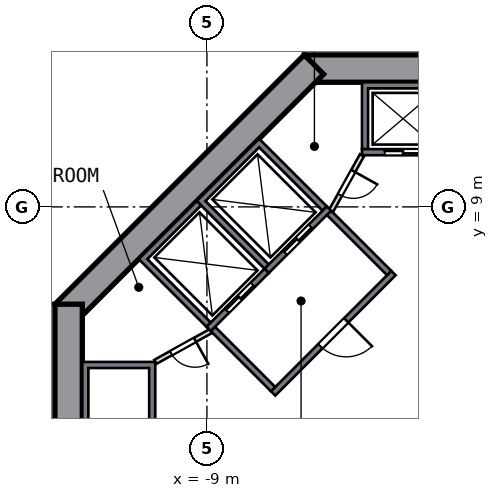
"""IFC4 building model, lengths in metres.
Left out: names, types, materials, properties, quantities, classifications, styles, units other than length and angle.
Written with IfcOpenShell. Run it as: python <this file> out.ifc"""

import sys

from ifc_helpers import new_model, si_unit, direction, frame, frame_2d, origin, place, context, subcontext, project, spatial, polyline, rectangle, outline, extrude, element, fill, save


model = new_model("IFC4")
c1 = context("Model", 3, precision=1e-05, world=origin(), true_north=direction((0.0, 1.0)))
c2 = subcontext(c1, "Body", "Model", "MODEL_VIEW")
j1 = project(units=[si_unit("LENGTHUNIT", "METRE"), si_unit("PLANEANGLEUNIT", "RADIAN")], contexts=[c1])
p1 = place(None, origin())
s1 = spatial("IfcSite", under=j1, at=p1, CompositionType="ELEMENT")
p2 = place(p1, origin())
s2 = spatial("IfcBuilding", under=s1, at=p2, CompositionType="ELEMENT")
p3 = place(p2, frame((0.0, 0.0, -3.9)))
s3 = spatial("IfcBuildingStorey", under=s2, at=p3, CompositionType="ELEMENT", Elevation=-3.9)
p4 = place(p3, frame((5.799, 13.55, 0.0), z_axis=(0.0, 0.0, 1.0), x_axis=(-1.0, 0.0, 0.0)))
e1 = element("IfcWall", 1, at=p4, inside=s3, PredefinedType="SHEAR", context=c2, shape_type="SweptSolid", body=[
    extrude(rectangle(XDim=11.598, YDim=0.9, at=frame_2d((5.799, 0.0))), origin(), (0.0, 0.0, 1.0), 3.9),
])
p5 = place(p4, frame((4.899, 0.0, 0.0)))
e2 = element("IfcOpeningElement", 2, at=p5, cuts=e1, PredefinedType="OPENING", context=c2, shape_type="SweptSolid", body=[
    extrude(rectangle(XDim=1.8, YDim=2.1, at=frame_2d((0.9, 1.05))), frame((0.0, 0.46, 0.0), z_axis=(0.0, -1.0, 0.0), x_axis=(1.0, 0.0, 0.0)), (0.0, 0.0, 1.0), 0.92),
])
p6 = place(p3, frame((-5.481, 13.682, 0.0), z_axis=(0.0, 0.0, 1.0), x_axis=(-0.707106781, -0.707106781, 0.0)))
e3 = element("IfcWall", 3, at=p6, inside=s3, PredefinedType="SHEAR", context=c2, shape_type="SweptSolid", body=[
    extrude(rectangle(XDim=11.598, YDim=0.9, at=frame_2d((5.799, 0.0))), origin(), (0.0, 0.0, 1.0), 3.9),
])
p7 = place(p3, frame((-13.55, 5.799, 0.0), z_axis=(0.0, 0.0, 1.0), x_axis=(0.0, -1.0, 0.0)))
e4 = element("IfcWall", 4, at=p7, inside=s3, PredefinedType="SHEAR", context=c2, shape_type="SweptSolid", body=[
    extrude(rectangle(XDim=11.598, YDim=0.9, at=frame_2d((5.799, 0.0))), origin(), (0.0, 0.0, 1.0), 3.9),
])
p8 = place(p7, frame((4.899, 0.0, 0.0)))
e5 = element("IfcOpeningElement", 5, at=p8, cuts=e4, PredefinedType="OPENING", context=c2, shape_type="SweptSolid", body=[
    extrude(rectangle(XDim=1.8, YDim=2.1, at=frame_2d((0.9, 1.05))), frame((0.0, 0.46, 0.0), z_axis=(0.0, -1.0, 0.0), x_axis=(1.0, 0.0, 0.0)), (0.0, 0.0, 1.0), 0.92),
])
p9 = place(p3, origin())
e6 = element("IfcWall", 6, at=p9, inside=s3, PredefinedType="SOLIDWALL", context=c2, shape_type="SweptSolid", body=[
    extrude(outline(polyline([(-3.9, 10.9), (-3.9, 13.1), (-1.2, 13.1), (-1.2, 10.9), (-1.4, 10.9), (-1.4, 12.9), (-3.7, 12.9), (-3.7, 10.9), (-3.9, 10.9)])), origin(), (0.0, 0.0, 1.0), 3.45),
])
p10 = place(p3, frame((-1.2, 10.8, 0.0), z_axis=(0.0, 0.0, 1.0), x_axis=(-1.0, 0.0, 0.0)))
e7 = element("IfcWall", 7, at=p10, inside=s3, PredefinedType="SOLIDWALL", context=c2, shape_type="SweptSolid", body=[
    extrude(rectangle(XDim=2.7, YDim=0.2, at=frame_2d((1.35, 0.0))), origin(), (0.0, 0.0, 1.0), 3.45),
])
p11 = place(p10, frame((0.75, 0.0, 0.0)))
e8 = element("IfcOpeningElement", 8, at=p11, cuts=e7, PredefinedType="OPENING", context=c2, shape_type="SweptSolid", body=[
    extrude(rectangle(XDim=1.2, YDim=2.1, at=frame_2d((0.6, 1.05))), frame((0.0, 0.11, 0.0), z_axis=(0.0, -1.0, 0.0), x_axis=(1.0, 0.0, 0.0)), (0.0, 0.0, 1.0), 0.22),
])
p12 = place(p3, origin())
e9 = element("IfcWall", 9, at=p12, inside=s3, PredefinedType="SOLIDWALL", context=c2, shape_type="SweptSolid", body=[
    extrude(outline(polyline([(-13.1, 1.2), (-13.1, 3.9), (-10.7, 3.9), (-10.7, 1.2), (-13.1, 1.2)]), holes=[polyline([(-10.9, 3.7), (-12.9, 3.7), (-12.9, 1.4), (-10.9, 1.4), (-10.9, 3.7)])]), origin(), (0.0, 0.0, 1.0), 3.45),
])
p13 = place(p3, origin())
e10 = element("IfcWall", 10, at=p13, inside=s3, PredefinedType="SOLIDWALL", context=c2, shape_type="SweptSolid", body=[
    extrude(outline(polyline([(-9.334, 9.192), (-7.283, 11.243), (-5.056, 9.016), (-5.197, 8.874), (-7.283, 10.96), (-9.051, 9.192), (-6.965, 7.106), (-7.106, 6.965), (-9.334, 9.192)])), origin(), (0.0, 0.0, 1.0), 3.45),
])
p14 = place(p3, frame((-4.985, 8.945, 0.0), z_axis=(0.0, 0.0, 1.0), x_axis=(-0.707106781, -0.707106781, 0.0)))
e11 = element("IfcWall", 11, at=p14, inside=s3, PredefinedType="SOLIDWALL", context=c2, shape_type="SweptSolid", body=[
    extrude(rectangle(XDim=2.9, YDim=0.2, at=frame_2d((1.45, 0.0))), origin(), (0.0, 0.0, 1.0), 3.45),
])
p15 = place(p14, frame((0.85, 0.0, 0.0)))
e12 = element("IfcOpeningElement", 12, at=p15, cuts=e11, PredefinedType="OPENING", context=c2, shape_type="SweptSolid", body=[
    extrude(rectangle(XDim=1.2, YDim=2.1, at=frame_2d((0.6, 1.05))), frame((0.0, 0.11, 0.0), z_axis=(0.0, -1.0, 0.0), x_axis=(1.0, 0.0, 0.0)), (0.0, 0.0, 1.0), 0.22),
])
p16 = place(p3, origin())
e13 = element("IfcWall", 13, at=p16, inside=s3, PredefinedType="SOLIDWALL", context=c2, shape_type="SweptSolid", body=[
    extrude(outline(polyline([(-11.243, 7.283), (-9.334, 9.192), (-9.192, 9.051), (-10.96, 7.283), (-8.874, 5.197), (-9.016, 5.056), (-11.243, 7.283)])), origin(), (0.0, 0.0, 1.0), 3.45),
])
p17 = place(p3, frame((-7.036, 6.894, 0.0), z_axis=(0.0, 0.0, 1.0), x_axis=(-0.707106781, -0.707106781, 0.0)))
e14 = element("IfcWall", 14, at=p17, inside=s3, PredefinedType="SOLIDWALL", context=c2, shape_type="SweptSolid", body=[
    extrude(rectangle(XDim=2.7, YDim=0.2, at=frame_2d((1.35, 0.0))), origin(), (0.0, 0.0, 1.0), 3.45),
])
p18 = place(p17, frame((0.65, 0.0, 0.0)))
e15 = element("IfcOpeningElement", 15, at=p18, cuts=e14, PredefinedType="OPENING", context=c2, shape_type="SweptSolid", body=[
    extrude(rectangle(XDim=1.2, YDim=2.1, at=frame_2d((0.6, 1.05))), frame((0.0, 0.11, 0.0), z_axis=(0.0, -1.0, 0.0), x_axis=(1.0, 0.0, 0.0)), (0.0, 0.0, 1.0), 0.22),
])
p19 = place(p3, frame((-2.864, 6.823, 0.0), z_axis=(0.0, 0.0, 1.0), x_axis=(-0.707106781, -0.707106781, 0.0)))
e16 = element("IfcWall", 16, at=p19, inside=s3, PredefinedType="SOLIDWALL", context=c2, shape_type="SweptSolid", body=[
    extrude(rectangle(XDim=5.6, YDim=0.2, at=frame_2d((2.8, 0.0))), origin(), (0.0, 0.0, 1.0), 3.45),
])
p20 = place(p19, frame((2.2, 0.0, 0.0)))
e17 = element("IfcOpeningElement", 17, at=p20, cuts=e16, PredefinedType="OPENING", context=c2, shape_type="SweptSolid", body=[
    extrude(rectangle(XDim=1.2, YDim=2.1, at=frame_2d((0.6, 1.05))), frame((0.0, 0.11, 0.0), z_axis=(0.0, -1.0, 0.0), x_axis=(1.0, 0.0, 0.0)), (0.0, 0.0, 1.0), 0.22),
])
for number, where, z_axis, x_axis in (
    (18, (-3.005, 6.823, 0.0), (0.0, 0.0, 1.0), (-0.707, 0.707, 0.0)),
    (19, (-6.823, 3.005, 0.0), (0.0, 0.0, 1.0), (-0.707, 0.707, 0.0)),
):
    element("IfcWall", number, at=place(p3, frame(where, z_axis=z_axis, x_axis=x_axis)), inside=s3, PredefinedType="SOLIDWALL", context=c2, shape_type="SweptSolid", body=[
        extrude(rectangle(XDim=2.8, YDim=0.2, at=frame_2d((1.4, 0.0))), origin(), (0.0, 0.0, 1.0), 3.45),
    ])
p21 = place(p3, frame((-3.9, 10.7, 0.0), z_axis=(0.0, 0.0, 1.0), x_axis=(-0.485692555, -0.874129705, 0.0)))
e20 = element("IfcWall", 20, at=p21, inside=s3, PredefinedType="PARTITIONING", context=c2, shape_type="SweptSolid", body=[
    extrude(rectangle(XDim=2.089, YDim=0.15, at=frame_2d((1.044, 0.0))), origin(), (0.0, 0.0, 1.0), 3.45),
])
p22 = place(p21, frame((0.594, 0.0, 0.0)))
e21 = element("IfcOpeningElement", 21, at=p22, cuts=e20, PredefinedType="OPENING", context=c2, shape_type="SweptSolid", body=[
    extrude(rectangle(XDim=0.9, YDim=2.1, at=frame_2d((0.45, 1.05))), frame((0.0, 0.085, 0.0), z_axis=(0.0, -1.0, 0.0), x_axis=(1.0, 0.0, 0.0)), (0.0, 0.0, 1.0), 0.17),
])
p23 = place(p3, frame((-8.874, 4.914, 0.0), z_axis=(0.0, 0.0, 1.0), x_axis=(-0.874129705, -0.485692555, 0.0)))
e22 = element("IfcWall", 22, at=p23, inside=s3, PredefinedType="PARTITIONING", context=c2, shape_type="SweptSolid", body=[
    extrude(rectangle(XDim=2.089, YDim=0.15, at=frame_2d((1.044, 0.0))), origin(), (0.0, 0.0, 1.0), 3.45),
])
p24 = place(p23, frame((0.594, 0.0, 0.0)))
e23 = element("IfcOpeningElement", 23, at=p24, cuts=e22, PredefinedType="OPENING", context=c2, shape_type="SweptSolid", body=[
    extrude(rectangle(XDim=0.9, YDim=2.1, at=frame_2d((0.45, 1.05))), frame((0.0, 0.085, 0.0), z_axis=(0.0, -1.0, 0.0), x_axis=(1.0, 0.0, 0.0)), (0.0, 0.0, 1.0), 0.17),
])
p25 = place(p11, origin())
e24 = element("IfcDoor", 24, at=p25, inside=s3, OperationType="DOUBLE_DOOR_SLIDING", PredefinedType="DOOR", context=c2, shape_type="SweptSolid", body=[
    extrude(rectangle(XDim=1.2, YDim=2.1, at=frame_2d((0.6, 1.05))), frame((0.0, 0.025, 0.0), z_axis=(0.0, -1.0, 0.0), x_axis=(1.0, 0.0, 0.0)), (0.0, 0.0, 1.0), 0.05),
])
fill(e8, e24)
p26 = place(p15, origin())
e25 = element("IfcDoor", 25, at=p26, inside=s3, OperationType="DOUBLE_DOOR_SLIDING", PredefinedType="DOOR", context=c2, shape_type="SweptSolid", body=[
    extrude(rectangle(XDim=1.2, YDim=2.1, at=frame_2d((0.6, 1.05))), frame((0.0, 0.025, 0.0), z_axis=(0.0, -1.0, 0.0), x_axis=(1.0, 0.0, 0.0)), (0.0, 0.0, 1.0), 0.05),
])
fill(e12, e25)
p27 = place(p18, origin())
e26 = element("IfcDoor", 26, at=p27, inside=s3, OperationType="DOUBLE_DOOR_SLIDING", PredefinedType="DOOR", context=c2, shape_type="SweptSolid", body=[
    extrude(rectangle(XDim=1.2, YDim=2.1, at=frame_2d((0.6, 1.05))), frame((0.0, 0.025, 0.0), z_axis=(0.0, -1.0, 0.0), x_axis=(1.0, 0.0, 0.0)), (0.0, 0.0, 1.0), 0.05),
])
fill(e15, e26)
p28 = place(p20, origin())
e27 = element("IfcDoor", 27, at=p28, inside=s3, OperationType="SINGLE_SWING_LEFT", PredefinedType="DOOR", context=c2, shape_type="SweptSolid", body=[
    extrude(rectangle(XDim=1.2, YDim=2.1, at=frame_2d((0.6, 1.05))), frame((0.0, 0.025, 0.0), z_axis=(0.0, -1.0, 0.0), x_axis=(1.0, 0.0, 0.0)), (0.0, 0.0, 1.0), 0.05),
])
fill(e17, e27)
p29 = place(p22, origin())
e28 = element("IfcDoor", 28, at=p29, inside=s3, OperationType="SINGLE_SWING_LEFT", PredefinedType="DOOR", context=c2, shape_type="SweptSolid", body=[
    extrude(rectangle(XDim=0.9, YDim=2.1, at=frame_2d((0.45, 1.05))), frame((0.0, 0.025, 0.0), z_axis=(0.0, -1.0, 0.0), x_axis=(1.0, 0.0, 0.0)), (0.0, 0.0, 1.0), 0.05),
])
fill(e21, e28)
p30 = place(p24, origin())
e29 = element("IfcDoor", 29, at=p30, inside=s3, OperationType="SINGLE_SWING_LEFT", PredefinedType="DOOR", context=c2, shape_type="SweptSolid", body=[
    extrude(rectangle(XDim=0.9, YDim=2.1, at=frame_2d((0.45, 1.05))), frame((0.0, 0.025, 0.0), z_axis=(0.0, -1.0, 0.0), x_axis=(1.0, 0.0, 0.0)), (0.0, 0.0, 1.0), 0.05),
])
fill(e23, e29)
save(model, sys.argv[1])
